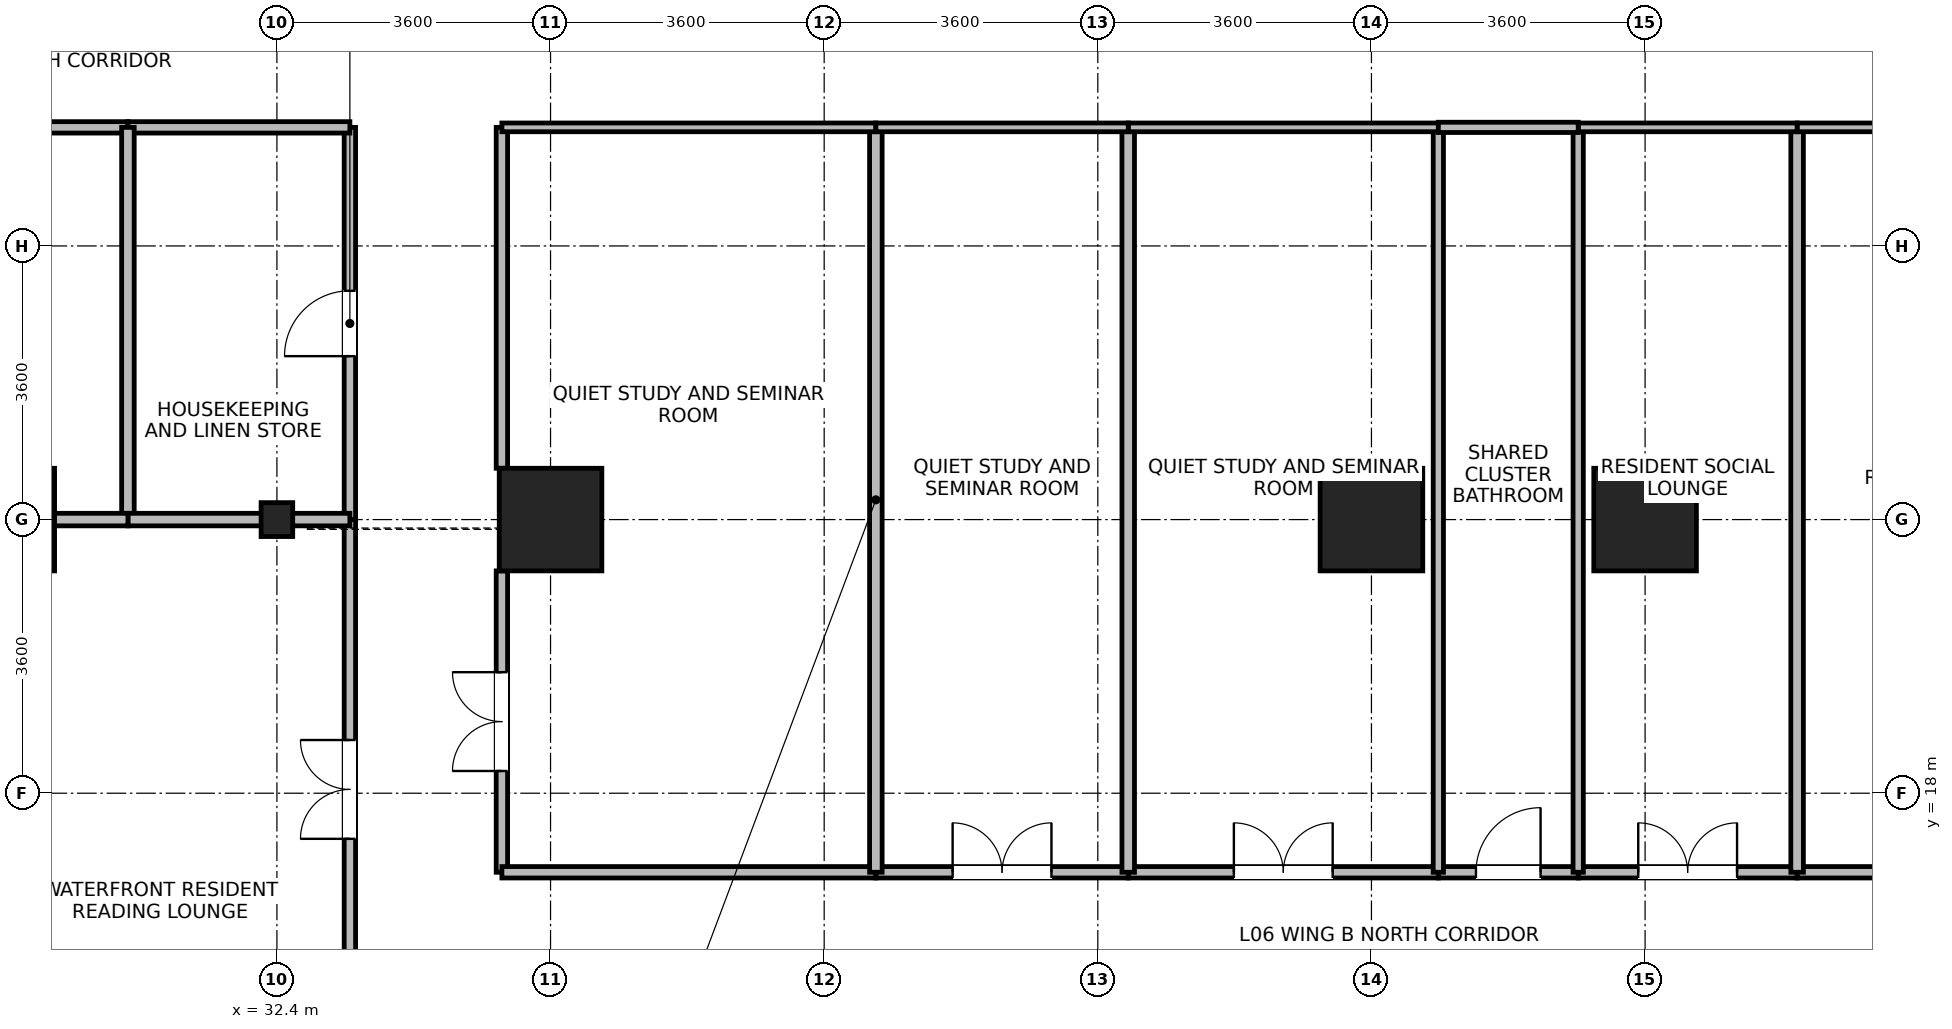
"""IFC4 building model, lengths in metres.
Left out: names, types, materials, properties, quantities, classifications, styles, units other than length and angle.
Written with IfcOpenShell. Run it as: python <this file> out.ifc"""

import sys

from ifc_helpers import new_model, si_unit, direction, frame, frame_2d, origin, origin_2d, place, context, subcontext, project, spatial, rectangle, i_section, extrude, source, transform, mapped, element, fill, save


model = new_model("IFC4")
c1 = context("Model", 3, precision=1e-05, world=origin(), true_north=direction((0.0, 1.0)))
c2 = subcontext(c1, "Body", "Model", "MODEL_VIEW")
j1 = project(units=[si_unit("LENGTHUNIT", "METRE"), si_unit("PLANEANGLEUNIT", "RADIAN")], contexts=[c1])
p1 = place(None, origin())
s1 = spatial("IfcSite", under=j1, at=p1, CompositionType="ELEMENT")
p2 = place(p1, origin())
s2 = spatial("IfcBuilding", under=s1, at=p2, CompositionType="ELEMENT")
p3 = place(p2, frame((0.0, 0.0, 29.0)))
s3 = spatial("IfcBuildingStorey", under=s2, at=p3, CompositionType="ELEMENT", Elevation=29.0)
m1 = source(origin(), c2, "Body", "SweptSolid", [
    extrude(rectangle(XDim=1.35, YDim=1.35, at=origin_2d()), origin(), (0.0, 0.0, 1.0), 3.7),
])
for number, where, z_axis, x_axis in (
    (1, (28.8, 21.6, 0.0), (0.0, 0.0, 1.0), (1.0, 0.0, 0.0)),
    (2, (36.0, 21.6, 0.0), (0.0, 0.0, 1.0), (1.0, 0.0, 0.0)),
    (3, (46.8, 21.6, 0.0), (0.0, 0.0, 1.0), (1.0, 0.0, 0.0)),
    (4, (50.4, 21.6, 0.0), (0.0, 0.0, 1.0), (1.0, 0.0, 0.0)),
):
    element("IfcColumn", number, at=place(p3, frame(where, z_axis=z_axis, x_axis=x_axis)), inside=s3, PredefinedType="COLUMN", context=c2, shape_type="MappedRepresentation", body=[
        mapped(m1, transform((0.0, 0.0, 0.0), x_axis=(1.0, 0.0, 0.0), y_axis=(0.0, 1.0, 0.0), z_axis=(0.0, 0.0, 1.0), scale=1.0)),
    ])
m2 = source(origin(), c2, "Body", "SweptSolid", [
    extrude(i_section(OverallWidth=0.416, OverallDepth=0.446, WebThickness=0.029, FlangeThickness=0.04, FilletRadius=0.015, at=origin_2d()), origin(), (0.0, 0.0, 1.0), 3.7),
])
p4 = place(p3, frame((32.4, 21.6, 0.0), z_axis=(0.0, 0.0, 1.0), x_axis=(1.0, 0.0, 0.0)))
e5 = element("IfcColumn", 5, at=p4, inside=s3, PredefinedType="COLUMN", context=c2, shape_type="MappedRepresentation", body=[
    mapped(m2, transform((0.0, 0.0, 0.0), x_axis=(1.0, 0.0, 0.0), y_axis=(0.0, 1.0, 0.0), z_axis=(0.0, 0.0, 1.0), scale=1.0)),
])
p5 = place(p3, frame((35.36, 16.96, 0.0), z_axis=(0.0, 0.0, 1.0), x_axis=(0.0, 1.0, 0.0)))
e6 = element("IfcWall", 6, at=p5, inside=s3, PredefinedType="PARTITIONING", context=c2, shape_type="SweptSolid", body=[
    extrude(rectangle(XDim=3.965, YDim=0.15, at=frame_2d((1.982, 0.0))), origin(), (0.0, 0.0, 1.0), 3.43),
])
p6 = place(p5, frame((1.333, 0.0, 0.0)))
e7 = element("IfcOpeningElement", 7, at=p6, cuts=e6, PredefinedType="OPENING", context=c2, shape_type="SweptSolid", body=[
    extrude(rectangle(XDim=1.3, YDim=2.12, at=frame_2d((0.65, 1.06))), frame((0.0, 0.085, 0.0), z_axis=(0.0, -1.0, 0.0), x_axis=(1.0, 0.0, 0.0)), (0.0, 0.0, 1.0), 0.17),
])
p7 = place(p3, frame((35.36, 22.275, 0.0), z_axis=(0.0, 0.0, 1.0), x_axis=(0.0, 1.0, 0.0)))
e8 = element("IfcWall", 8, at=p7, inside=s3, PredefinedType="PARTITIONING", context=c2, shape_type="SweptSolid", body=[
    extrude(rectangle(XDim=4.485, YDim=0.15, at=frame_2d((2.243, 0.0))), origin(), (0.0, 0.0, 1.0), 3.43),
])
p8 = place(p3, frame((33.36, 14.5, 0.0), z_axis=(0.0, 0.0, 1.0), x_axis=(0.0, 1.0, 0.0)))
e9 = element("IfcWall", 9, at=p8, inside=s3, PredefinedType="PARTITIONING", context=c2, shape_type="SweptSolid", body=[
    extrude(rectangle(XDim=7.1, YDim=0.15, at=frame_2d((3.55, 0.0))), origin(), (0.0, 0.0, 1.0), 3.43),
])
p9 = place(p8, frame((2.9, 0.0, 0.0)))
e10 = element("IfcOpeningElement", 10, at=p9, cuts=e9, PredefinedType="OPENING", context=c2, shape_type="SweptSolid", body=[
    extrude(rectangle(XDim=1.3, YDim=2.12, at=frame_2d((0.65, 1.06))), frame((0.0, 0.085, 0.0), z_axis=(0.0, -1.0, 0.0), x_axis=(1.0, 0.0, 0.0)), (0.0, 0.0, 1.0), 0.17),
])
p10 = place(p3, frame((24.58, 26.76, 0.0), z_axis=(0.0, 0.0, 1.0), x_axis=(1.0, 0.0, 0.0)))
e11 = element("IfcWall", 11, at=p10, inside=s3, PredefinedType="PARTITIONING", context=c2, shape_type="SweptSolid", body=[
    extrude(rectangle(XDim=5.86, YDim=0.15, at=frame_2d((2.93, 0.0))), origin(), (0.0, 0.0, 1.0), 3.43),
])
p11 = place(p10, frame((2.455, 0.0, 0.0)))
e12 = element("IfcOpeningElement", 12, at=p11, cuts=e11, PredefinedType="OPENING", context=c2, shape_type="SweptSolid", body=[
    extrude(rectangle(XDim=0.95, YDim=2.1, at=frame_2d((0.475, 1.05))), frame((0.0, 0.085, 0.0), z_axis=(0.0, -1.0, 0.0), x_axis=(1.0, 0.0, 0.0)), (0.0, 0.0, 1.0), 0.17),
])
p12 = place(p3, frame((52.4, 16.96, 0.0), z_axis=(0.0, 0.0, 1.0), x_axis=(1.0, 0.0, 0.0)))
e13 = element("IfcWall", 13, at=p12, inside=s3, PredefinedType="PARTITIONING", context=c2, shape_type="SweptSolid", body=[
    extrude(rectangle(XDim=5.068, YDim=0.15, at=frame_2d((2.534, 0.0))), origin(), (0.0, 0.0, 1.0), 3.43),
])
p13 = place(p12, frame((1.884, 0.0, 0.0)))
e14 = element("IfcOpeningElement", 14, at=p13, cuts=e13, PredefinedType="OPENING", context=c2, shape_type="SweptSolid", body=[
    extrude(rectangle(XDim=1.3, YDim=2.12, at=frame_2d((0.65, 1.06))), frame((0.0, 0.085, 0.0), z_axis=(0.0, -1.0, 0.0), x_axis=(1.0, 0.0, 0.0)), (0.0, 0.0, 1.0), 0.17),
])
p14 = place(p3, frame((33.36, 21.6, 0.0), z_axis=(0.0, 0.0, 1.0), x_axis=(0.0, 1.0, 0.0)))
e15 = element("IfcWall", 15, at=p14, inside=s3, PredefinedType="PARTITIONING", context=c2, shape_type="SweptSolid", body=[
    extrude(rectangle(XDim=5.16, YDim=0.15, at=frame_2d((2.58, 0.0))), origin(), (0.0, 0.0, 1.0), 3.43),
])
p15 = place(p14, frame((2.15, 0.0, 0.0)))
e16 = element("IfcOpeningElement", 16, at=p15, cuts=e15, PredefinedType="OPENING", context=c2, shape_type="SweptSolid", body=[
    extrude(rectangle(XDim=0.86, YDim=2.02, at=frame_2d((0.43, 1.01))), frame((0.0, 0.085, 0.0), z_axis=(0.0, -1.0, 0.0), x_axis=(1.0, 0.0, 0.0)), (0.0, 0.0, 1.0), 0.17),
])
p16 = place(p3, frame((35.36, 16.96, 0.0), z_axis=(0.0, 0.0, 1.0), x_axis=(1.0, 0.0, 0.0)))
e17 = element("IfcWall", 17, at=p16, inside=s3, PredefinedType="PARTITIONING", context=c2, shape_type="SweptSolid", body=[
    extrude(rectangle(XDim=4.92, YDim=0.15, at=frame_2d((2.46, 0.0))), origin(), (0.0, 0.0, 1.0), 3.43),
])
p17 = place(p3, frame((43.6, 16.96, 0.0), z_axis=(0.0, 0.0, 1.0), x_axis=(1.0, 0.0, 0.0)))
e18 = element("IfcWall", 18, at=p17, inside=s3, PredefinedType="PARTITIONING", context=c2, shape_type="SweptSolid", body=[
    extrude(rectangle(XDim=4.08, YDim=0.15, at=frame_2d((2.04, 0.0))), origin(), (0.0, 0.0, 1.0), 3.43),
])
p18 = place(p17, frame((1.39, 0.0, 0.0)))
e19 = element("IfcOpeningElement", 19, at=p18, cuts=e18, PredefinedType="OPENING", context=c2, shape_type="SweptSolid", body=[
    extrude(rectangle(XDim=1.3, YDim=2.12, at=frame_2d((0.65, 1.06))), frame((0.0, 0.085, 0.0), z_axis=(0.0, -1.0, 0.0), x_axis=(1.0, 0.0, 0.0)), (0.0, 0.0, 1.0), 0.17),
])
p19 = place(p3, frame((40.28, 16.96, 0.0), z_axis=(0.0, 0.0, 1.0), x_axis=(1.0, 0.0, 0.0)))
e20 = element("IfcWall", 20, at=p19, inside=s3, PredefinedType="PARTITIONING", context=c2, shape_type="SweptSolid", body=[
    extrude(rectangle(XDim=3.32, YDim=0.15, at=frame_2d((1.66, 0.0))), origin(), (0.0, 0.0, 1.0), 3.43),
])
p20 = place(p19, frame((1.01, 0.0, 0.0)))
e21 = element("IfcOpeningElement", 21, at=p20, cuts=e20, PredefinedType="OPENING", context=c2, shape_type="SweptSolid", body=[
    extrude(rectangle(XDim=1.3, YDim=2.12, at=frame_2d((0.65, 1.06))), frame((0.0, 0.085, 0.0), z_axis=(0.0, -1.0, 0.0), x_axis=(1.0, 0.0, 0.0)), (0.0, 0.0, 1.0), 0.17),
])
p21 = place(p3, frame((30.44, 26.76, 0.0), z_axis=(0.0, 0.0, 1.0), x_axis=(1.0, 0.0, 0.0)))
e22 = element("IfcWall", 22, at=p21, inside=s3, PredefinedType="PARTITIONING", context=c2, shape_type="SweptSolid", body=[
    extrude(rectangle(XDim=2.92, YDim=0.15, at=frame_2d((1.46, 0.0))), origin(), (0.0, 0.0, 1.0), 3.43),
])
p22 = place(p3, frame((49.52, 16.96, 0.0), z_axis=(0.0, 0.0, 1.0), x_axis=(1.0, 0.0, 0.0)))
e23 = element("IfcWall", 23, at=p22, inside=s3, PredefinedType="PARTITIONING", context=c2, shape_type="SweptSolid", body=[
    extrude(rectangle(XDim=2.88, YDim=0.15, at=frame_2d((1.44, 0.0))), origin(), (0.0, 0.0, 1.0), 3.43),
])
p23 = place(p22, frame((0.79, 0.0, 0.0)))
e24 = element("IfcOpeningElement", 24, at=p23, cuts=e23, PredefinedType="OPENING", context=c2, shape_type="SweptSolid", body=[
    extrude(rectangle(XDim=1.3, YDim=2.12, at=frame_2d((0.65, 1.06))), frame((0.0, 0.085, 0.0), z_axis=(0.0, -1.0, 0.0), x_axis=(1.0, 0.0, 0.0)), (0.0, 0.0, 1.0), 0.17),
])
p24 = place(p3, frame((47.68, 16.96, 0.0), z_axis=(0.0, 0.0, 1.0), x_axis=(1.0, 0.0, 0.0)))
e25 = element("IfcWall", 25, at=p24, inside=s3, PredefinedType="PARTITIONING", context=c2, shape_type="SweptSolid", body=[
    extrude(rectangle(XDim=1.84, YDim=0.15, at=frame_2d((0.92, 0.0))), origin(), (0.0, 0.0, 1.0), 3.43),
])
p25 = place(p24, frame((0.495, 0.0, 0.0)))
e26 = element("IfcOpeningElement", 26, at=p25, cuts=e25, PredefinedType="OPENING", context=c2, shape_type="SweptSolid", body=[
    extrude(rectangle(XDim=0.85, YDim=2.04, at=frame_2d((0.425, 1.02))), frame((0.0, 0.085, 0.0), z_axis=(0.0, -1.0, 0.0), x_axis=(1.0, 0.0, 0.0)), (0.0, 0.0, 1.0), 0.17),
])
for number, where, z_axis, x_axis in (
    (27, (40.28, 16.96, 0.0), (0.0, 0.0, 1.0), (0.0, 1.0, 0.0)),
    (28, (43.6, 16.96, 0.0), (0.0, 0.0, 1.0), (0.0, 1.0, 0.0)),
):
    element("IfcWall", number, at=place(p3, frame(where, z_axis=z_axis, x_axis=x_axis)), inside=s3, PredefinedType="PARTITIONING", context=c2, shape_type="SweptSolid", body=[
        extrude(rectangle(XDim=9.8, YDim=0.165, at=frame_2d((4.9, 0.0))), origin(), (0.0, 0.0, 1.0), 3.43),
    ])
for number, where, z_axis, x_axis in (
    (29, (47.68, 16.96, 0.0), (0.0, 0.0, 1.0), (0.0, 1.0, 0.0)),
    (30, (49.52, 16.96, 0.0), (0.0, 0.0, 1.0), (0.0, 1.0, 0.0)),
):
    element("IfcWall", number, at=place(p3, frame(where, z_axis=z_axis, x_axis=x_axis)), inside=s3, PredefinedType="PARTITIONING", context=c2, shape_type="SweptSolid", body=[
        extrude(rectangle(XDim=9.8, YDim=0.135, at=frame_2d((4.9, 0.0))), origin(), (0.0, 0.0, 1.0), 3.43),
    ])
p26 = place(p3, frame((52.4, 16.96, 0.0), z_axis=(0.0, 0.0, 1.0), x_axis=(0.0, 1.0, 0.0)))
e31 = element("IfcWall", 31, at=p26, inside=s3, PredefinedType="PARTITIONING", context=c2, shape_type="SweptSolid", body=[
    extrude(rectangle(XDim=9.8, YDim=0.165, at=frame_2d((4.9, 0.0))), origin(), (0.0, 0.0, 1.0), 3.43),
])
p27 = place(p3, frame((52.4, 26.76, 0.0), z_axis=(0.0, 0.0, 1.0), x_axis=(1.0, 0.0, 0.0)))
e32 = element("IfcWall", 32, at=p27, inside=s3, PredefinedType="PARTITIONING", context=c2, shape_type="SweptSolid", body=[
    extrude(rectangle(XDim=5.068, YDim=0.115, at=frame_2d((2.534, 0.0))), origin(), (0.0, 0.0, 1.0), 3.43),
])
p28 = place(p3, frame((30.44, 21.6, 0.0), z_axis=(0.0, 0.0, 1.0), x_axis=(0.0, 1.0, 0.0)))
e33 = element("IfcWall", 33, at=p28, inside=s3, PredefinedType="PARTITIONING", context=c2, shape_type="SweptSolid", body=[
    extrude(rectangle(XDim=5.16, YDim=0.165, at=frame_2d((2.58, 0.0))), origin(), (0.0, 0.0, 1.0), 3.43),
])
p29 = place(p3, frame((35.36, 26.76, 0.0), z_axis=(0.0, 0.0, 1.0), x_axis=(1.0, 0.0, 0.0)))
e34 = element("IfcWall", 34, at=p29, inside=s3, PredefinedType="PARTITIONING", context=c2, shape_type="SweptSolid", body=[
    extrude(rectangle(XDim=4.92, YDim=0.115, at=frame_2d((2.46, 0.0))), origin(), (0.0, 0.0, 1.0), 3.43),
])
p30 = place(p3, frame((43.6, 26.76, 0.0), z_axis=(0.0, 0.0, 1.0), x_axis=(1.0, 0.0, 0.0)))
e35 = element("IfcWall", 35, at=p30, inside=s3, PredefinedType="PARTITIONING", context=c2, shape_type="SweptSolid", body=[
    extrude(rectangle(XDim=4.08, YDim=0.115, at=frame_2d((2.04, 0.0))), origin(), (0.0, 0.0, 1.0), 3.43),
])
p31 = place(p3, frame((40.28, 26.76, 0.0), z_axis=(0.0, 0.0, 1.0), x_axis=(1.0, 0.0, 0.0)))
e36 = element("IfcWall", 36, at=p31, inside=s3, PredefinedType="PARTITIONING", context=c2, shape_type="SweptSolid", body=[
    extrude(rectangle(XDim=3.32, YDim=0.115, at=frame_2d((1.66, 0.0))), origin(), (0.0, 0.0, 1.0), 3.43),
])
p32 = place(p3, frame((30.44, 21.6, 0.0), z_axis=(0.0, 0.0, 1.0), x_axis=(1.0, 0.0, 0.0)))
e37 = element("IfcWall", 37, at=p32, inside=s3, PredefinedType="PARTITIONING", context=c2, shape_type="SweptSolid", body=[
    extrude(rectangle(XDim=2.92, YDim=0.165, at=frame_2d((1.46, 0.0))), origin(), (0.0, 0.0, 1.0), 2.93),
])
p33 = place(p3, frame((49.52, 26.76, 0.0), z_axis=(0.0, 0.0, 1.0), x_axis=(1.0, 0.0, 0.0)))
e38 = element("IfcWall", 38, at=p33, inside=s3, PredefinedType="PARTITIONING", context=c2, shape_type="SweptSolid", body=[
    extrude(rectangle(XDim=2.88, YDim=0.115, at=frame_2d((1.44, 0.0))), origin(), (0.0, 0.0, 1.0), 3.43),
])
p34 = place(p3, frame((47.68, 26.76, 0.0), z_axis=(0.0, 0.0, 1.0), x_axis=(1.0, 0.0, 0.0)))
e39 = element("IfcWall", 39, at=p34, inside=s3, PredefinedType="PARTITIONING", context=c2, shape_type="SweptSolid", body=[
    extrude(rectangle(XDim=1.84, YDim=0.135, at=frame_2d((0.92, 0.0))), origin(), (0.0, 0.0, 1.0), 3.43),
])
p35 = place(p3, frame((28.932, 21.6, 0.0), z_axis=(0.0, 0.0, 1.0), x_axis=(1.0, 0.0, 0.0)))
e40 = element("IfcWall", 40, at=p35, inside=s3, PredefinedType="PARTITIONING", context=c2, shape_type="SweptSolid", body=[
    extrude(rectangle(XDim=1.508, YDim=0.165, at=frame_2d((0.754, 0.0))), origin(), (0.0, 0.0, 1.0), 2.93),
])
p36 = place(p6, origin())
e41 = element("IfcDoor", 41, at=p36, inside=s3, OperationType="DOUBLE_DOOR_SINGLE_SWING", PredefinedType="DOOR", context=c2, shape_type="SweptSolid", body=[
    extrude(rectangle(XDim=1.3, YDim=2.12, at=frame_2d((0.65, 1.06))), frame((0.0, 0.025, 0.0), z_axis=(0.0, -1.0, 0.0), x_axis=(1.0, 0.0, 0.0)), (0.0, 0.0, 1.0), 0.05),
])
fill(e7, e41)
p37 = place(p9, origin())
e42 = element("IfcDoor", 42, at=p37, inside=s3, OperationType="DOUBLE_DOOR_SINGLE_SWING", PredefinedType="DOOR", context=c2, shape_type="SweptSolid", body=[
    extrude(rectangle(XDim=1.3, YDim=2.12, at=frame_2d((0.65, 1.06))), frame((0.0, 0.025, 0.0), z_axis=(0.0, -1.0, 0.0), x_axis=(1.0, 0.0, 0.0)), (0.0, 0.0, 1.0), 0.05),
])
fill(e10, e42)
p38 = place(p15, origin())
e43 = element("IfcDoor", 43, at=p38, inside=s3, OperationType="SINGLE_SWING_LEFT", PredefinedType="DOOR", context=c2, shape_type="SweptSolid", body=[
    extrude(rectangle(XDim=0.86, YDim=2.02, at=frame_2d((0.43, 1.01))), frame((0.0, 0.025, 0.0), z_axis=(0.0, -1.0, 0.0), x_axis=(1.0, 0.0, 0.0)), (0.0, 0.0, 1.0), 0.05),
])
fill(e16, e43)
p39 = place(p18, origin())
e44 = element("IfcDoor", 44, at=p39, inside=s3, OperationType="DOUBLE_DOOR_SINGLE_SWING", PredefinedType="DOOR", context=c2, shape_type="SweptSolid", body=[
    extrude(rectangle(XDim=1.3, YDim=2.12, at=frame_2d((0.65, 1.06))), frame((0.0, 0.025, 0.0), z_axis=(0.0, -1.0, 0.0), x_axis=(1.0, 0.0, 0.0)), (0.0, 0.0, 1.0), 0.05),
])
fill(e19, e44)
p40 = place(p20, origin())
e45 = element("IfcDoor", 45, at=p40, inside=s3, OperationType="DOUBLE_DOOR_SINGLE_SWING", PredefinedType="DOOR", context=c2, shape_type="SweptSolid", body=[
    extrude(rectangle(XDim=1.3, YDim=2.12, at=frame_2d((0.65, 1.06))), frame((0.0, 0.025, 0.0), z_axis=(0.0, -1.0, 0.0), x_axis=(1.0, 0.0, 0.0)), (0.0, 0.0, 1.0), 0.05),
])
fill(e21, e45)
p41 = place(p23, origin())
e46 = element("IfcDoor", 46, at=p41, inside=s3, OperationType="DOUBLE_DOOR_SINGLE_SWING", PredefinedType="DOOR", context=c2, shape_type="SweptSolid", body=[
    extrude(rectangle(XDim=1.3, YDim=2.12, at=frame_2d((0.65, 1.06))), frame((0.0, 0.025, 0.0), z_axis=(0.0, -1.0, 0.0), x_axis=(1.0, 0.0, 0.0)), (0.0, 0.0, 1.0), 0.05),
])
fill(e24, e46)
p42 = place(p25, origin())
e47 = element("IfcDoor", 47, at=p42, inside=s3, OperationType="SINGLE_SWING_RIGHT", PredefinedType="DOOR", context=c2, shape_type="SweptSolid", body=[
    extrude(rectangle(XDim=0.85, YDim=2.04, at=frame_2d((0.425, 1.02))), frame((0.0, 0.025, 0.0), z_axis=(0.0, -1.0, 0.0), x_axis=(1.0, 0.0, 0.0)), (0.0, 0.0, 1.0), 0.05),
])
fill(e26, e47)
save(model, sys.argv[1])
